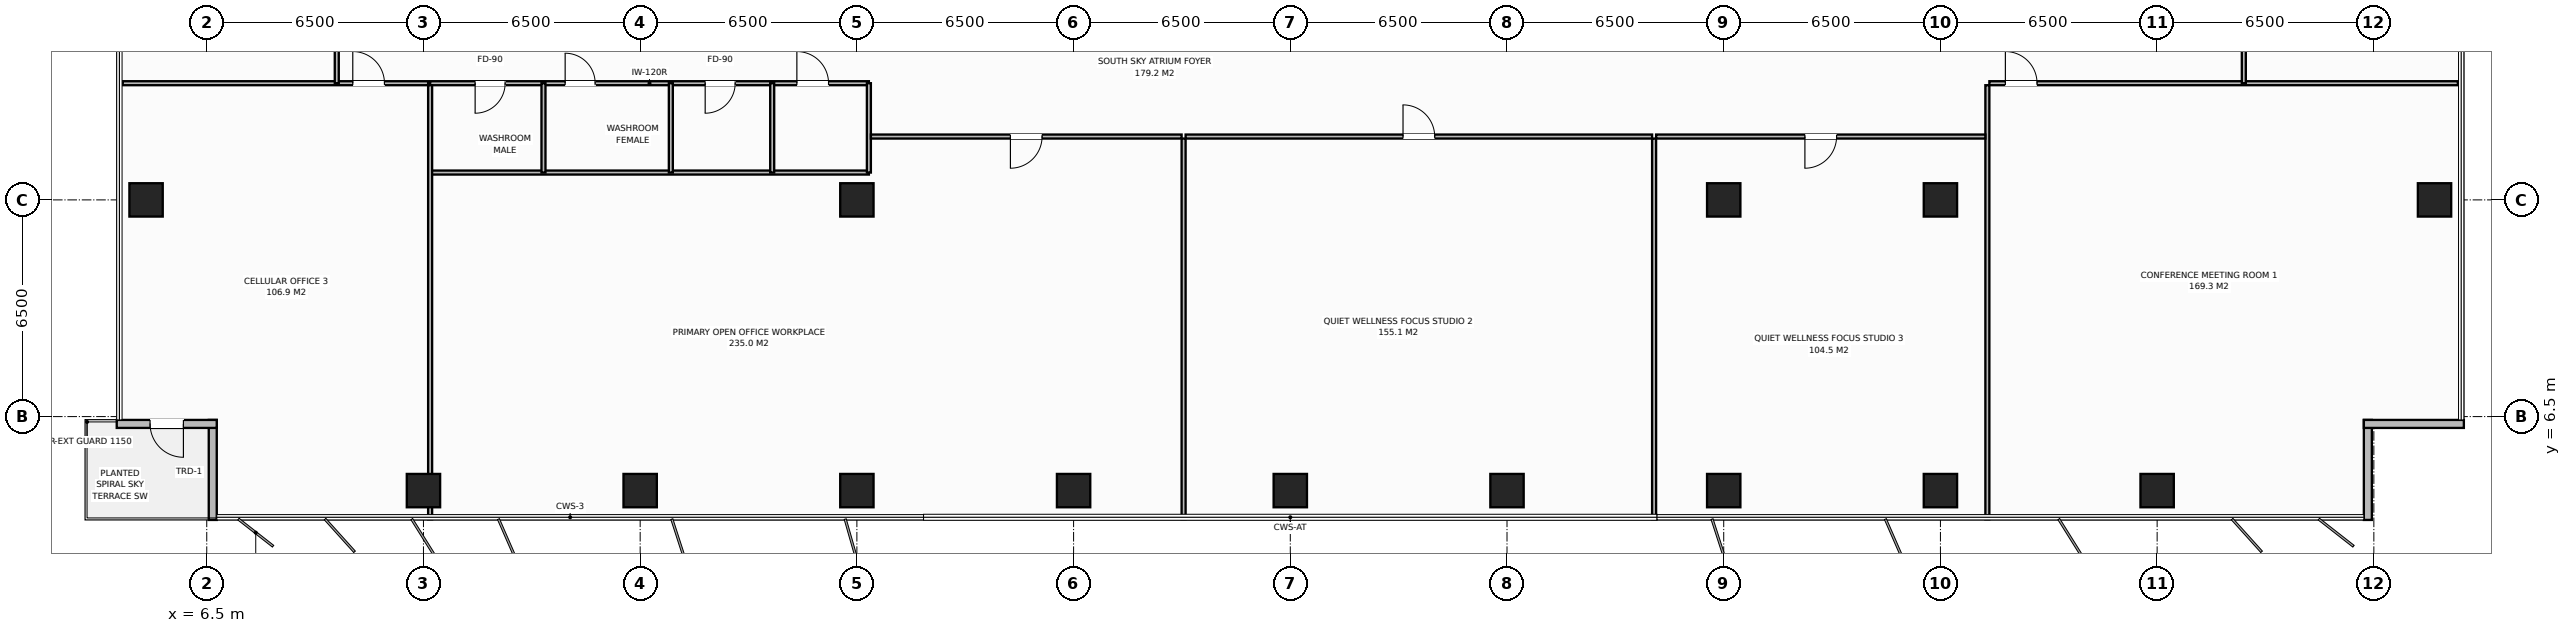
"""IFC4 building model, lengths in metres.
Left out: names, types, materials, properties, quantities, classifications, styles, units other than length and angle.
Written with IfcOpenShell. Run it as: python <this file> out.ifc"""

import sys

from ifc_helpers import new_model, si_unit, direction, frame, frame_2d, origin, origin_2d, place, context, subcontext, project, spatial, rectangle, extrude, element, fill, save


model = new_model("IFC4")
c1 = context("Model", 3, precision=1e-05, world=origin(), true_north=direction((0.0, 1.0)))
c2 = subcontext(c1, "Body", "Model", "MODEL_VIEW")
j1 = project(units=[si_unit("LENGTHUNIT", "METRE"), si_unit("PLANEANGLEUNIT", "RADIAN")], contexts=[c1])
p1 = place(None, origin())
s1 = spatial("IfcSite", under=j1, at=p1, CompositionType="ELEMENT")
p2 = place(p1, origin())
s2 = spatial("IfcBuilding", under=s1, at=p2, CompositionType="ELEMENT")
p3 = place(p2, frame((0.0, 0.0, 159.4)))
s3 = spatial("IfcBuildingStorey", under=s2, at=p3, CompositionType="ELEMENT", Elevation=159.4)
for number, where, z_axis, x_axis in (
    (1, (58.5, 13.0, 0.0), (0.0, 0.0, 1.0), (1.0, 0.0, 0.0)),
    (2, (26.0, 13.0, 0.0), (0.0, 0.0, 1.0), (1.0, 0.0, 0.0)),
    (3, (52.0, 13.0, 0.0), (0.0, 0.0, 1.0), (1.0, 0.0, 0.0)),
    (4, (13.0, 4.28, 0.0), (0.0, 0.0, 1.0), (1.0, 0.0, 0.0)),
    (5, (19.5, 4.28, 0.0), (0.0, 0.0, 1.0), (1.0, 0.0, 0.0)),
    (6, (26.0, 4.28, 0.0), (0.0, 0.0, 1.0), (1.0, 0.0, 0.0)),
    (7, (32.5, 4.28, 0.0), (0.0, 0.0, 1.0), (1.0, 0.0, 0.0)),
    (8, (39.0, 4.28, 0.0), (0.0, 0.0, 1.0), (1.0, 0.0, 0.0)),
    (9, (45.5, 4.28, 0.0), (0.0, 0.0, 1.0), (1.0, 0.0, 0.0)),
    (10, (52.0, 4.28, 0.0), (0.0, 0.0, 1.0), (1.0, 0.0, 0.0)),
    (11, (58.5, 4.28, 0.0), (0.0, 0.0, 1.0), (1.0, 0.0, 0.0)),
    (12, (65.0, 4.28, 0.0), (0.0, 0.0, 1.0), (1.0, 0.0, 0.0)),
    (13, (4.68, 13.0, 0.0), (0.0, 0.0, 1.0), (1.0, 0.0, 0.0)),
    (14, (73.32, 13.0, 0.0), (0.0, 0.0, 1.0), (1.0, 0.0, 0.0)),
):
    element("IfcColumn", number, at=place(p3, frame(where, z_axis=z_axis, x_axis=x_axis)), inside=s3, PredefinedType="COLUMN", context=c2, shape_type="SweptSolid", body=[
        extrude(rectangle(XDim=1.0, YDim=1.0, at=origin_2d()), origin(), (0.0, 0.0, 1.0), 3.8),
    ])
p4 = place(p3, frame((6.68, 3.4, 0.0), z_axis=(0.0, 0.0, 1.0), x_axis=(0.0, 1.0, 0.0)))
e15 = element("IfcWall", 15, at=p4, inside=s3, PredefinedType="STANDARD", context=c2, shape_type="SweptSolid", body=[
    extrude(rectangle(XDim=3.0, YDim=0.24, at=frame_2d((1.5, 0.0))), origin(), (0.0, 0.0, 1.0), 3.572),
])
p5 = place(p3, frame((6.8, 6.28, 0.0), z_axis=(0.0, 0.0, 1.0), x_axis=(-1.0, 0.0, 0.0)))
e16 = element("IfcWall", 16, at=p5, inside=s3, PredefinedType="STANDARD", context=c2, shape_type="SweptSolid", body=[
    extrude(rectangle(XDim=3.0, YDim=0.24, at=frame_2d((1.5, 0.0))), origin(), (0.0, 0.0, 1.0), 3.572),
])
p6 = place(p5, frame((1.0, 0.0, 0.0)))
e17 = element("IfcOpeningElement", 17, at=p6, cuts=e16, PredefinedType="OPENING", context=c2, shape_type="SweptSolid", body=[
    extrude(rectangle(XDim=1.0, YDim=2.2, at=frame_2d((0.5, 1.1))), frame((0.0, 0.13, 0.0), z_axis=(0.0, -1.0, 0.0), x_axis=(1.0, 0.0, 0.0)), (0.0, 0.0, 1.0), 0.26),
])
for number, where, z_axis, x_axis in (
    (18, (71.32, 6.4, 0.0), (0.0, 0.0, 1.0), (0.0, -1.0, 0.0)),
    (19, (74.2, 6.28, 0.0), (0.0, 0.0, 1.0), (-1.0, 0.0, 0.0)),
):
    element("IfcWall", number, at=place(p3, frame(where, z_axis=z_axis, x_axis=x_axis)), inside=s3, PredefinedType="STANDARD", context=c2, shape_type="SweptSolid", body=[
        extrude(rectangle(XDim=3.0, YDim=0.24, at=frame_2d((1.5, 0.0))), origin(), (0.0, 0.0, 1.0), 3.572),
    ])
p7 = place(p3, frame((13.2, 16.5, 0.0), z_axis=(0.0, 0.0, 1.0), x_axis=(1.0, 0.0, 0.0)))
e20 = element("IfcWall", 20, at=p7, inside=s3, PredefinedType="PARTITIONING", context=c2, shape_type="SweptSolid", body=[
    extrude(rectangle(XDim=13.16, YDim=0.12, at=frame_2d((6.58, 0.0))), origin(), (0.0, 0.0, 1.0), 3.572),
])
p8 = place(p7, frame((1.35, 0.0, 0.0)))
e21 = element("IfcOpeningElement", 21, at=p8, cuts=e20, PredefinedType="OPENING", context=c2, shape_type="SweptSolid", body=[
    extrude(rectangle(XDim=0.9, YDim=2.15, at=frame_2d((0.45, 1.075))), frame((0.0, 0.07, 0.0), z_axis=(0.0, -1.0, 0.0), x_axis=(1.0, 0.0, 0.0)), (0.0, 0.0, 1.0), 0.14),
])
p9 = place(p7, frame((4.05, 0.0, 0.0)))
e22 = element("IfcOpeningElement", 22, at=p9, cuts=e20, PredefinedType="OPENING", context=c2, shape_type="SweptSolid", body=[
    extrude(rectangle(XDim=0.9, YDim=2.15, at=frame_2d((0.45, 1.075))), frame((0.0, 0.07, 0.0), z_axis=(0.0, -1.0, 0.0), x_axis=(1.0, 0.0, 0.0)), (0.0, 0.0, 1.0), 0.14),
])
p10 = place(p7, frame((8.25, 0.0, 0.0)))
e23 = element("IfcOpeningElement", 23, at=p10, cuts=e20, PredefinedType="OPENING", context=c2, shape_type="SweptSolid", body=[
    extrude(rectangle(XDim=0.9, YDim=2.15, at=frame_2d((0.45, 1.075))), frame((0.0, 0.07, 0.0), z_axis=(0.0, -1.0, 0.0), x_axis=(1.0, 0.0, 0.0)), (0.0, 0.0, 1.0), 0.14),
])
p11 = place(p7, frame((11.0, 0.0, 0.0)))
e24 = element("IfcOpeningElement", 24, at=p11, cuts=e20, PredefinedType="OPENING", context=c2, shape_type="SweptSolid", body=[
    extrude(rectangle(XDim=0.95, YDim=2.15, at=frame_2d((0.475, 1.075))), frame((0.0, 0.07, 0.0), z_axis=(0.0, -1.0, 0.0), x_axis=(1.0, 0.0, 0.0)), (0.0, 0.0, 1.0), 0.14),
])
p12 = place(p3, frame((13.2, 13.82, 0.0), z_axis=(0.0, 0.0, 1.0), x_axis=(1.0, 0.0, 0.0)))
e25 = element("IfcWall", 25, at=p12, inside=s3, PredefinedType="PARTITIONING", context=c2, shape_type="SweptSolid", body=[
    extrude(rectangle(XDim=13.16, YDim=0.12, at=frame_2d((6.58, 0.0))), origin(), (0.0, 0.0, 1.0), 3.572),
])
for number, where, z_axis, x_axis in (
    (26, (16.6, 13.82, 0.0), (0.0, 0.0, 1.0), (0.0, 1.0, 0.0)),
    (27, (20.42, 13.82, 0.0), (0.0, 0.0, 1.0), (0.0, 1.0, 0.0)),
    (28, (23.46, 13.82, 0.0), (0.0, 0.0, 1.0), (0.0, 1.0, 0.0)),
    (29, (26.36, 13.82, 0.0), (0.0, 0.0, 1.0), (0.0, 1.0, 0.0)),
):
    element("IfcWall", number, at=place(p3, frame(where, z_axis=z_axis, x_axis=x_axis)), inside=s3, PredefinedType="PARTITIONING", context=c2, shape_type="SweptSolid", body=[
        extrude(rectangle(XDim=2.68, YDim=0.12, at=frame_2d((1.34, 0.0))), origin(), (0.0, 0.0, 1.0), 3.572),
    ])
p13 = place(p3, frame((13.2, 3.42, 0.0), z_axis=(0.0, 0.0, 1.0), x_axis=(0.0, 1.0, 0.0)))
e30 = element("IfcWall", 30, at=p13, inside=s3, PredefinedType="PARTITIONING", context=c2, shape_type="SweptSolid", body=[
    extrude(rectangle(XDim=13.02, YDim=0.12, at=frame_2d((6.51, 0.0))), origin(), (0.0, 0.0, 1.0), 3.022),
])
p14 = place(p3, frame((3.98, 16.5, 0.0), z_axis=(0.0, 0.0, 1.0), x_axis=(1.0, 0.0, 0.0)))
e31 = element("IfcWall", 31, at=p14, inside=s3, PredefinedType="PARTITIONING", context=c2, shape_type="SweptSolid", body=[
    extrude(rectangle(XDim=9.16, YDim=0.12, at=frame_2d((4.58, 0.0))), origin(), (0.0, 0.0, 1.0), 3.572),
])
p15 = place(p14, frame((6.9, 0.0, 0.0)))
e32 = element("IfcOpeningElement", 32, at=p15, cuts=e31, PredefinedType="OPENING", context=c2, shape_type="SweptSolid", body=[
    extrude(rectangle(XDim=0.95, YDim=2.15, at=frame_2d((0.475, 1.075))), frame((0.0, 0.07, 0.0), z_axis=(0.0, -1.0, 0.0), x_axis=(1.0, 0.0, 0.0)), (0.0, 0.0, 1.0), 0.14),
])
p16 = place(p3, frame((35.8, 3.42, 0.0), z_axis=(0.0, 0.0, 1.0), x_axis=(0.0, 1.0, 0.0)))
e33 = element("IfcWall", 33, at=p16, inside=s3, PredefinedType="PARTITIONING", context=c2, shape_type="SweptSolid", body=[
    extrude(rectangle(XDim=11.42, YDim=0.12, at=frame_2d((5.71, 0.0))), origin(), (0.0, 0.0, 1.0), 3.572),
])
p17 = place(p3, frame((26.42, 14.9, 0.0), z_axis=(0.0, 0.0, 1.0), x_axis=(1.0, 0.0, 0.0)))
e34 = element("IfcWall", 34, at=p17, inside=s3, PredefinedType="PARTITIONING", context=c2, shape_type="SweptSolid", body=[
    extrude(rectangle(XDim=9.32, YDim=0.12, at=frame_2d((4.66, 0.0))), origin(), (0.0, 0.0, 1.0), 3.572),
])
p18 = place(p17, frame((4.185, 0.0, 0.0)))
e35 = element("IfcOpeningElement", 35, at=p18, cuts=e34, PredefinedType="OPENING", context=c2, shape_type="SweptSolid", body=[
    extrude(rectangle(XDim=0.95, YDim=2.15, at=frame_2d((0.475, 1.075))), frame((0.0, 0.07, 0.0), z_axis=(0.0, -1.0, 0.0), x_axis=(1.0, 0.0, 0.0)), (0.0, 0.0, 1.0), 0.14),
])
p19 = place(p3, frame((49.912, 3.42, 0.0), z_axis=(0.0, 0.0, 1.0), x_axis=(0.0, 1.0, 0.0)))
e36 = element("IfcWall", 36, at=p19, inside=s3, PredefinedType="PARTITIONING", context=c2, shape_type="SweptSolid", body=[
    extrude(rectangle(XDim=11.42, YDim=0.12, at=frame_2d((5.71, 0.0))), origin(), (0.0, 0.0, 1.0), 3.572),
])
p20 = place(p3, frame((35.86, 14.9, 0.0), z_axis=(0.0, 0.0, 1.0), x_axis=(1.0, 0.0, 0.0)))
e37 = element("IfcWall", 37, at=p20, inside=s3, PredefinedType="PARTITIONING", context=c2, shape_type="SweptSolid", body=[
    extrude(rectangle(XDim=13.992, YDim=0.12, at=frame_2d((6.996, 0.0))), origin(), (0.0, 0.0, 1.0), 3.572),
])
p21 = place(p20, frame((6.521, 0.0, 0.0)))
e38 = element("IfcOpeningElement", 38, at=p21, cuts=e37, PredefinedType="OPENING", context=c2, shape_type="SweptSolid", body=[
    extrude(rectangle(XDim=0.95, YDim=2.15, at=frame_2d((0.475, 1.075))), frame((0.0, 0.07, 0.0), z_axis=(0.0, -1.0, 0.0), x_axis=(1.0, 0.0, 0.0)), (0.0, 0.0, 1.0), 0.14),
])
p22 = place(p3, frame((59.908, 3.42, 0.0), z_axis=(0.0, 0.0, 1.0), x_axis=(0.0, 1.0, 0.0)))
e39 = element("IfcWall", 39, at=p22, inside=s3, PredefinedType="PARTITIONING", context=c2, shape_type="SweptSolid", body=[
    extrude(rectangle(XDim=13.02, YDim=0.12, at=frame_2d((6.51, 0.0))), origin(), (0.0, 0.0, 1.0), 3.572),
])
p23 = place(p3, frame((49.972, 14.9, 0.0), z_axis=(0.0, 0.0, 1.0), x_axis=(1.0, 0.0, 0.0)))
e40 = element("IfcWall", 40, at=p23, inside=s3, PredefinedType="PARTITIONING", context=c2, shape_type="SweptSolid", body=[
    extrude(rectangle(XDim=9.876, YDim=0.12, at=frame_2d((4.938, 0.0))), origin(), (0.0, 0.0, 1.0), 3.572),
])
p24 = place(p23, frame((4.463, 0.0, 0.0)))
e41 = element("IfcOpeningElement", 41, at=p24, cuts=e40, PredefinedType="OPENING", context=c2, shape_type="SweptSolid", body=[
    extrude(rectangle(XDim=0.95, YDim=2.15, at=frame_2d((0.475, 1.075))), frame((0.0, 0.07, 0.0), z_axis=(0.0, -1.0, 0.0), x_axis=(1.0, 0.0, 0.0)), (0.0, 0.0, 1.0), 0.14),
])
p25 = place(p3, frame((59.968, 16.5, 0.0), z_axis=(0.0, 0.0, 1.0), x_axis=(1.0, 0.0, 0.0)))
e42 = element("IfcWall", 42, at=p25, inside=s3, PredefinedType="PARTITIONING", context=c2, shape_type="SweptSolid", body=[
    extrude(rectangle(XDim=14.052, YDim=0.12, at=frame_2d((7.026, 0.0))), origin(), (0.0, 0.0, 1.0), 3.572),
])
p26 = place(p25, frame((0.48, 0.0, 0.0)))
e43 = element("IfcOpeningElement", 43, at=p26, cuts=e42, PredefinedType="OPENING", context=c2, shape_type="SweptSolid", body=[
    extrude(rectangle(XDim=0.95, YDim=2.15, at=frame_2d((0.475, 1.075))), frame((0.0, 0.07, 0.0), z_axis=(0.0, -1.0, 0.0), x_axis=(1.0, 0.0, 0.0)), (0.0, 0.0, 1.0), 0.14),
])
p27 = place(p3, frame((10.4, 16.5, 0.0), z_axis=(0.0, 0.0, 1.0), x_axis=(0.0, 1.0, 0.0)))
e44 = element("IfcWall", 44, at=p27, inside=s3, PredefinedType="PARTITIONING", context=c2, shape_type="SweptSolid", body=[
    extrude(rectangle(XDim=6.333, YDim=0.12, at=frame_2d((3.167, 0.0))), origin(), (0.0, 0.0, 1.0), 3.572),
])
p28 = place(p27, frame((3.742, 0.0, 0.0)))
e45 = element("IfcOpeningElement", 45, at=p28, cuts=e44, PredefinedType="OPENING", context=c2, shape_type="SweptSolid", body=[
    extrude(rectangle(XDim=0.95, YDim=2.15, at=frame_2d((0.475, 1.075))), frame((0.0, 0.07, 0.0), z_axis=(0.0, -1.0, 0.0), x_axis=(1.0, 0.0, 0.0)), (0.0, 0.0, 1.0), 0.14),
])
p29 = place(p3, frame((67.6, 16.5, 0.0), z_axis=(0.0, 0.0, 1.0), x_axis=(0.0, 1.0, 0.0)))
e46 = element("IfcWall", 46, at=p29, inside=s3, PredefinedType="PARTITIONING", context=c2, shape_type="SweptSolid", body=[
    extrude(rectangle(XDim=19.0, YDim=0.12, at=frame_2d((9.5, 0.0))), origin(), (0.0, 0.0, 1.0), 3.572),
])
p30 = place(p29, frame((9.025, 0.0, 0.0)))
e47 = element("IfcOpeningElement", 47, at=p30, cuts=e46, PredefinedType="OPENING", context=c2, shape_type="SweptSolid", body=[
    extrude(rectangle(XDim=0.95, YDim=2.15, at=frame_2d((0.475, 1.075))), frame((0.0, 0.07, 0.0), z_axis=(0.0, -1.0, 0.0), x_axis=(1.0, 0.0, 0.0)), (0.0, 0.0, 1.0), 0.14),
])
p31 = place(p6, origin())
e48 = element("IfcDoor", 48, at=p31, inside=s3, OperationType="SINGLE_SWING_LEFT", PredefinedType="DOOR", context=c2, shape_type="SweptSolid", body=[
    extrude(rectangle(XDim=1.0, YDim=2.2, at=frame_2d((0.5, 1.1))), frame((0.0, 0.025, 0.0), z_axis=(0.0, -1.0, 0.0), x_axis=(1.0, 0.0, 0.0)), (0.0, 0.0, 1.0), 0.05),
])
fill(e17, e48)
p32 = place(p8, origin())
e49 = element("IfcDoor", 49, at=p32, inside=s3, OperationType="SINGLE_SWING_RIGHT", PredefinedType="DOOR", context=c2, shape_type="SweptSolid", body=[
    extrude(rectangle(XDim=0.9, YDim=2.15, at=frame_2d((0.45, 1.075))), frame((0.0, 0.025, 0.0), z_axis=(0.0, -1.0, 0.0), x_axis=(1.0, 0.0, 0.0)), (0.0, 0.0, 1.0), 0.05),
])
fill(e21, e49)
p33 = place(p9, origin())
e50 = element("IfcDoor", 50, at=p33, inside=s3, OperationType="SINGLE_SWING_LEFT", PredefinedType="DOOR", context=c2, shape_type="SweptSolid", body=[
    extrude(rectangle(XDim=0.9, YDim=2.15, at=frame_2d((0.45, 1.075))), frame((0.0, 0.025, 0.0), z_axis=(0.0, -1.0, 0.0), x_axis=(1.0, 0.0, 0.0)), (0.0, 0.0, 1.0), 0.05),
])
fill(e22, e50)
p34 = place(p10, origin())
e51 = element("IfcDoor", 51, at=p34, inside=s3, OperationType="SINGLE_SWING_RIGHT", PredefinedType="DOOR", context=c2, shape_type="SweptSolid", body=[
    extrude(rectangle(XDim=0.9, YDim=2.15, at=frame_2d((0.45, 1.075))), frame((0.0, 0.025, 0.0), z_axis=(0.0, -1.0, 0.0), x_axis=(1.0, 0.0, 0.0)), (0.0, 0.0, 1.0), 0.05),
])
fill(e23, e51)
p35 = place(p11, origin())
e52 = element("IfcDoor", 52, at=p35, inside=s3, OperationType="SINGLE_SWING_LEFT", PredefinedType="DOOR", context=c2, shape_type="SweptSolid", body=[
    extrude(rectangle(XDim=0.95, YDim=2.15, at=frame_2d((0.475, 1.075))), frame((0.0, 0.025, 0.0), z_axis=(0.0, -1.0, 0.0), x_axis=(1.0, 0.0, 0.0)), (0.0, 0.0, 1.0), 0.05),
])
fill(e24, e52)
p36 = place(p15, origin())
e53 = element("IfcDoor", 53, at=p36, inside=s3, OperationType="SINGLE_SWING_LEFT", PredefinedType="DOOR", context=c2, shape_type="SweptSolid", body=[
    extrude(rectangle(XDim=0.95, YDim=2.15, at=frame_2d((0.475, 1.075))), frame((0.0, 0.025, 0.0), z_axis=(0.0, -1.0, 0.0), x_axis=(1.0, 0.0, 0.0)), (0.0, 0.0, 1.0), 0.05),
])
fill(e32, e53)
p37 = place(p18, origin())
e54 = element("IfcDoor", 54, at=p37, inside=s3, OperationType="SINGLE_SWING_RIGHT", PredefinedType="DOOR", context=c2, shape_type="SweptSolid", body=[
    extrude(rectangle(XDim=0.95, YDim=2.15, at=frame_2d((0.475, 1.075))), frame((0.0, 0.025, 0.0), z_axis=(0.0, -1.0, 0.0), x_axis=(1.0, 0.0, 0.0)), (0.0, 0.0, 1.0), 0.05),
])
fill(e35, e54)
p38 = place(p21, origin())
e55 = element("IfcDoor", 55, at=p38, inside=s3, OperationType="SINGLE_SWING_LEFT", PredefinedType="DOOR", context=c2, shape_type="SweptSolid", body=[
    extrude(rectangle(XDim=0.95, YDim=2.15, at=frame_2d((0.475, 1.075))), frame((0.0, 0.025, 0.0), z_axis=(0.0, -1.0, 0.0), x_axis=(1.0, 0.0, 0.0)), (0.0, 0.0, 1.0), 0.05),
])
fill(e38, e55)
p39 = place(p24, origin())
e56 = element("IfcDoor", 56, at=p39, inside=s3, OperationType="SINGLE_SWING_RIGHT", PredefinedType="DOOR", context=c2, shape_type="SweptSolid", body=[
    extrude(rectangle(XDim=0.95, YDim=2.15, at=frame_2d((0.475, 1.075))), frame((0.0, 0.025, 0.0), z_axis=(0.0, -1.0, 0.0), x_axis=(1.0, 0.0, 0.0)), (0.0, 0.0, 1.0), 0.05),
])
fill(e41, e56)
p40 = place(p26, origin())
e57 = element("IfcDoor", 57, at=p40, inside=s3, OperationType="SINGLE_SWING_LEFT", PredefinedType="DOOR", context=c2, shape_type="SweptSolid", body=[
    extrude(rectangle(XDim=0.95, YDim=2.15, at=frame_2d((0.475, 1.075))), frame((0.0, 0.025, 0.0), z_axis=(0.0, -1.0, 0.0), x_axis=(1.0, 0.0, 0.0)), (0.0, 0.0, 1.0), 0.05),
])
fill(e43, e57)
save(model, sys.argv[1])
